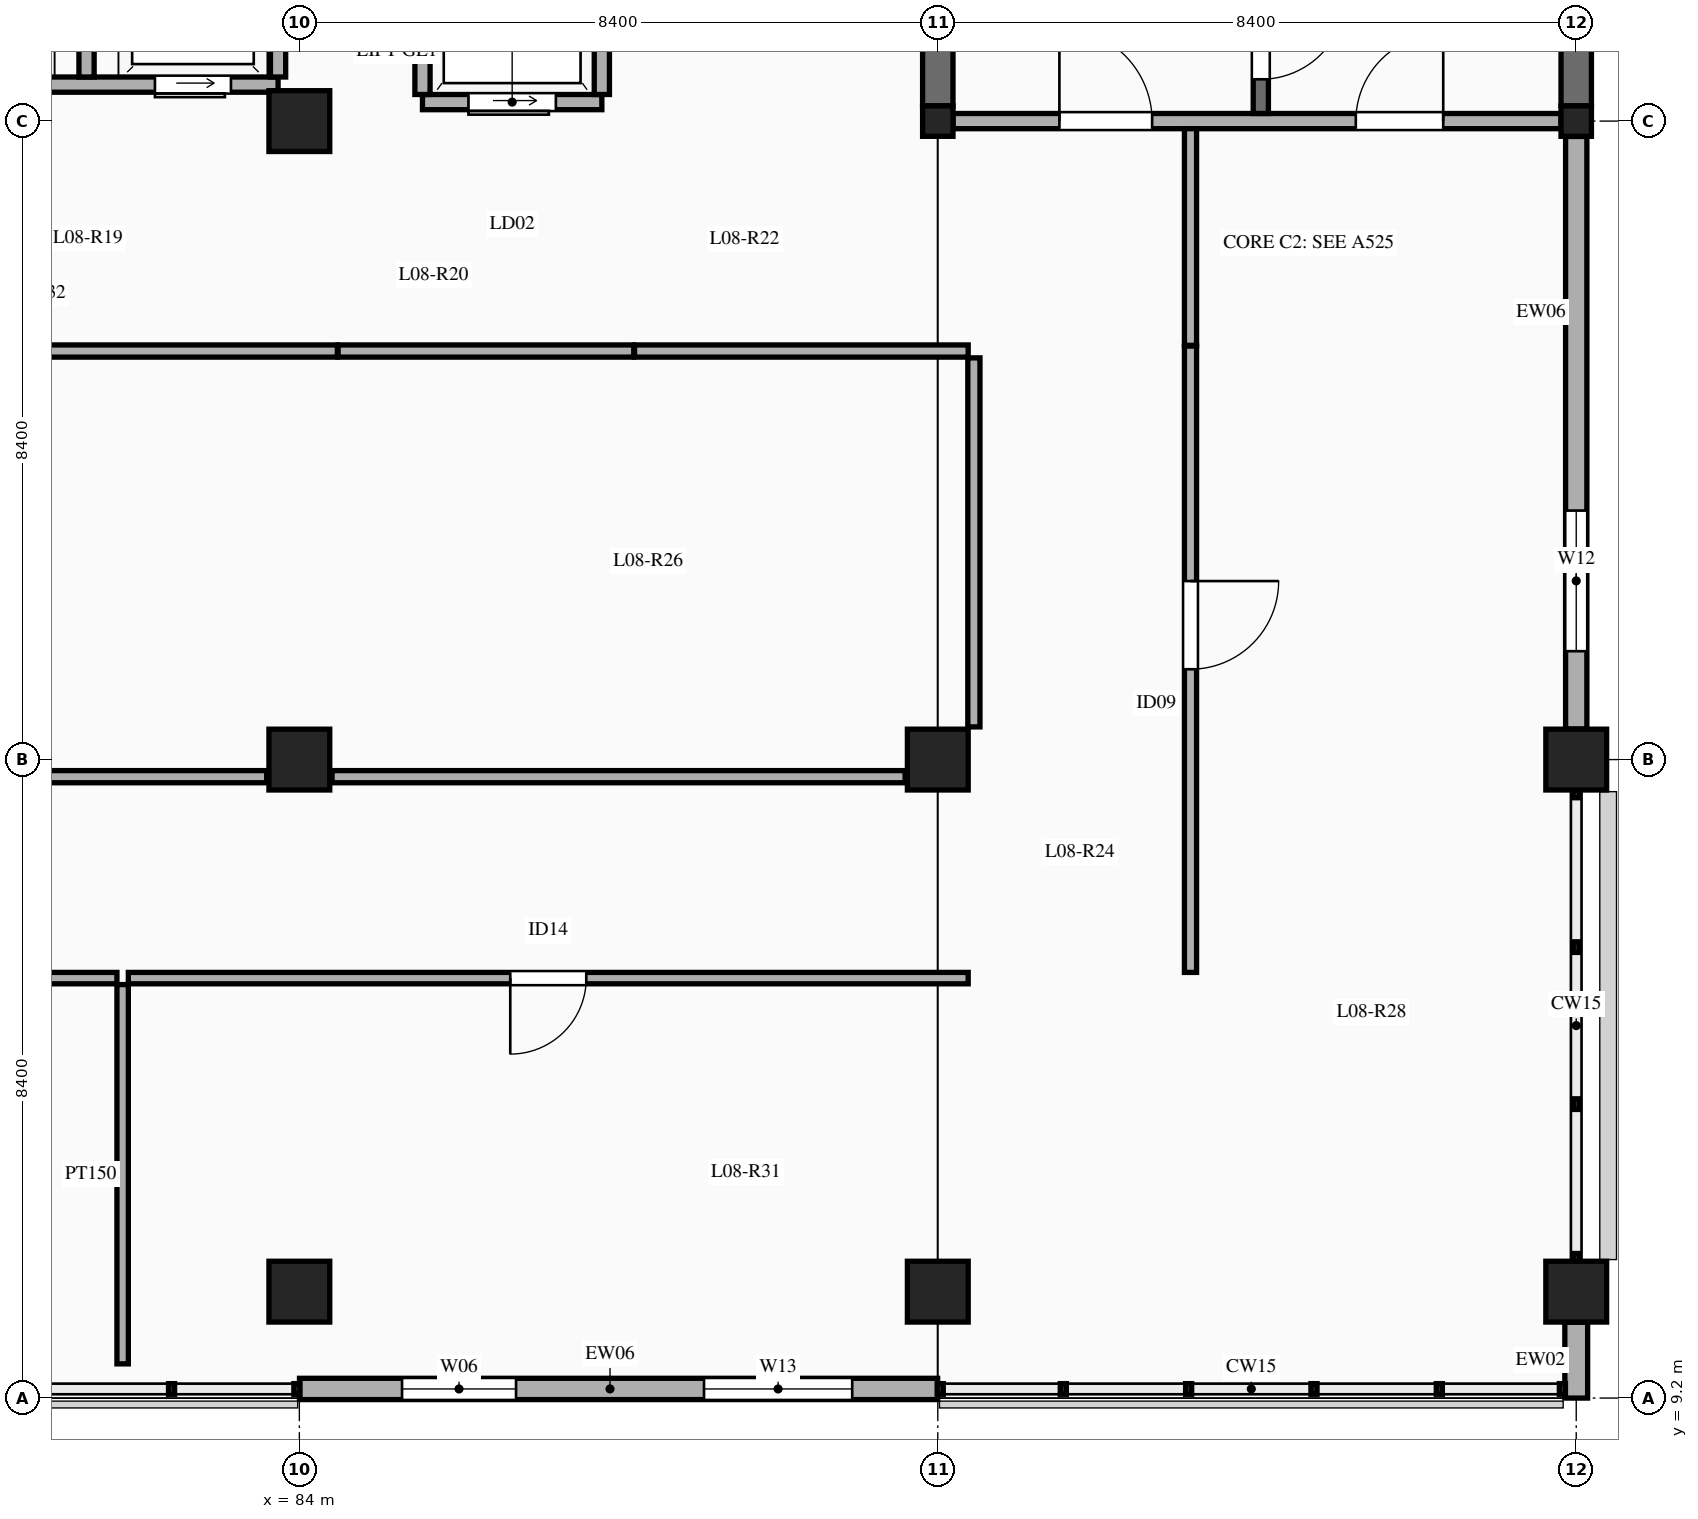
"""IFC4 building model, lengths in metres.
Left out: names, types, materials, properties, quantities, classifications, styles, units other than length and angle.
Written with IfcOpenShell. Run it as: python <this file> out.ifc"""

import sys

from ifc_helpers import new_model, si_unit, direction, frame, frame_2d, origin, origin_2d, place, context, subcontext, project, spatial, rectangle, extrude, element, fill, save


model = new_model("IFC4")
c1 = context("Model", 3, precision=1e-05, world=origin(), true_north=direction((0.0, 1.0)))
c2 = subcontext(c1, "Body", "Model", "MODEL_VIEW")
j1 = project(units=[si_unit("LENGTHUNIT", "METRE"), si_unit("PLANEANGLEUNIT", "RADIAN")], contexts=[c1])
p1 = place(None, origin())
s1 = spatial("IfcSite", under=j1, at=p1, CompositionType="ELEMENT")
p2 = place(p1, origin())
s2 = spatial("IfcBuilding", under=s1, at=p2, CompositionType="ELEMENT")
p3 = place(p2, frame((0.0, 0.0, 37.5)))
s3 = spatial("IfcBuildingStorey", under=s2, at=p3, CompositionType="ELEMENT", Elevation=37.5)
for number, where, z_axis, x_axis in (
    (1, (84.0, 10.6, 0.0), (0.0, 0.0, 1.0), (1.0, 0.0, 0.0)),
    (2, (84.0, 17.6, 0.0), (0.0, 0.0, 1.0), (1.0, 0.0, 0.0)),
    (3, (84.0, 26.0, 0.0), (0.0, 0.0, 1.0), (1.0, 0.0, 0.0)),
    (4, (92.4, 10.6, 0.0), (0.0, 0.0, 1.0), (1.0, 0.0, 0.0)),
    (5, (92.4, 17.6, 0.0), (0.0, 0.0, 1.0), (1.0, 0.0, 0.0)),
):
    element("IfcColumn", number, at=place(p3, frame(where, z_axis=z_axis, x_axis=x_axis)), inside=s3, PredefinedType="COLUMN", context=c2, shape_type="SweptSolid", body=[
        extrude(rectangle(XDim=0.8, YDim=0.8, at=origin_2d()), origin(), (0.0, 0.0, 1.0), 4.5),
    ])
p4 = place(p3, frame((92.4, 26.0, 0.0), z_axis=(0.0, 0.0, 1.0), x_axis=(1.0, 0.0, 0.0)))
e6 = element("IfcColumn", 6, at=p4, inside=s3, PredefinedType="COLUMN", context=c2, shape_type="SweptSolid", body=[
    extrude(rectangle(XDim=0.4, YDim=0.4, at=origin_2d()), origin(), (0.0, 0.0, 1.0), 4.5),
])
for number, where, z_axis, x_axis in (
    (7, (100.8, 10.6, 0.0), (0.0, 0.0, 1.0), (1.0, 0.0, 0.0)),
    (8, (100.8, 17.6, 0.0), (0.0, 0.0, 1.0), (1.0, 0.0, 0.0)),
):
    element("IfcColumn", number, at=place(p3, frame(where, z_axis=z_axis, x_axis=x_axis)), inside=s3, PredefinedType="COLUMN", context=c2, shape_type="SweptSolid", body=[
        extrude(rectangle(XDim=0.8, YDim=0.8, at=origin_2d()), origin(), (0.0, 0.0, 1.0), 4.5),
    ])
p5 = place(p3, frame((100.8, 26.0, 0.0), z_axis=(0.0, 0.0, 1.0), x_axis=(1.0, 0.0, 0.0)))
e9 = element("IfcColumn", 9, at=p5, inside=s3, PredefinedType="COLUMN", context=c2, shape_type="SweptSolid", body=[
    extrude(rectangle(XDim=0.4, YDim=0.4, at=origin_2d()), origin(), (0.0, 0.0, 1.0), 4.5),
])
for number, where, z_axis, x_axis in (
    (10, (92.4, 26.2, 0.0), (0.0, 0.0, 1.0), (0.0, 1.0, 0.0)),
    (11, (100.8, 26.2, 0.0), (0.0, 0.0, 1.0), (0.0, 1.0, 0.0)),
):
    element("IfcWall", number, at=place(p3, frame(where, z_axis=z_axis, x_axis=x_axis)), inside=s3, PredefinedType="SHEAR", context=c2, shape_type="SweptSolid", body=[
        extrude(rectangle(XDim=8.0, YDim=0.4, at=frame_2d((4.0, 0.0))), origin(), (0.0, 0.0, 1.0), 4.5),
    ])
p6 = place(p3, frame((100.8, 9.2, 0.0), z_axis=(0.0, 0.0, 1.0), x_axis=(0.0, 1.0, 0.0)))
e12 = element("IfcWall", 12, at=p6, inside=s3, PredefinedType="SOLIDWALL", context=c2, shape_type="SweptSolid", body=[
    extrude(rectangle(XDim=0.998, YDim=0.3, at=frame_2d((0.499, 0.0))), origin(), (0.0, 0.0, 1.0), 3.55),
])
p7 = place(p3, frame((84.002, 9.32, 0.0), z_axis=(0.0, 0.0, 1.0), x_axis=(1.0, 0.0, 0.0)))
e13 = element("IfcWall", 13, at=p7, inside=s3, PredefinedType="ELEMENTEDWALL", context=c2, shape_type="SweptSolid", body=[
    extrude(rectangle(XDim=8.396, YDim=0.28, at=frame_2d((4.198, 0.0))), origin(), (0.0, 0.0, 1.0), 3.55),
])
p8 = place(p7, frame((1.349, 0.0, 0.9)))
e14 = element("IfcOpeningElement", 14, at=p8, cuts=e13, PredefinedType="OPENING", context=c2, shape_type="SweptSolid", body=[
    extrude(rectangle(XDim=1.5, YDim=2.0, at=frame_2d((0.75, 1.0))), frame((0.0, 0.15, 0.0), z_axis=(0.0, -1.0, 0.0), x_axis=(1.0, 0.0, 0.0)), (0.0, 0.0, 1.0), 0.3),
])
p9 = place(p7, frame((5.322, 0.0, 0.9)))
e15 = element("IfcOpeningElement", 15, at=p9, cuts=e13, PredefinedType="OPENING", context=c2, shape_type="SweptSolid", body=[
    extrude(rectangle(XDim=1.95, YDim=2.0, at=frame_2d((0.975, 1.0))), frame((0.0, 0.15, 0.0), z_axis=(0.0, -1.0, 0.0), x_axis=(1.0, 0.0, 0.0)), (0.0, 0.0, 1.0), 0.3),
])
p10 = place(p3, frame((100.8, 18.002, 0.0), z_axis=(0.0, 0.0, 1.0), x_axis=(0.0, 1.0, 0.0)))
e16 = element("IfcWall", 16, at=p10, inside=s3, PredefinedType="ELEMENTEDWALL", context=c2, shape_type="SweptSolid", body=[
    extrude(rectangle(XDim=7.796, YDim=0.28, at=frame_2d((3.898, 0.0))), origin(), (0.0, 0.0, 1.0), 3.55),
])
p11 = place(p10, frame((1.024, 0.0, 0.9)))
e17 = element("IfcOpeningElement", 17, at=p11, cuts=e16, PredefinedType="OPENING", context=c2, shape_type="SweptSolid", body=[
    extrude(rectangle(XDim=1.85, YDim=2.05, at=frame_2d((0.925, 1.025))), frame((0.0, 0.15, 0.0), z_axis=(0.0, -1.0, 0.0), x_axis=(1.0, 0.0, 0.0)), (0.0, 0.0, 1.0), 0.3),
])
p12 = place(p3, frame((92.6, 26.0, 0.0), z_axis=(0.0, 0.0, 1.0), x_axis=(1.0, 0.0, 0.0)))
e18 = element("IfcWall", 18, at=p12, inside=s3, PredefinedType="SOLIDWALL", context=c2, shape_type="SweptSolid", body=[
    extrude(rectangle(XDim=8.0, YDim=0.2, at=frame_2d((4.0, 0.0))), origin(), (0.0, 0.0, 1.0), 3.78),
])
p13 = place(p12, frame((1.4, 0.0, 0.0)))
e19 = element("IfcOpeningElement", 19, at=p13, cuts=e18, PredefinedType="OPENING", context=c2, shape_type="SweptSolid", body=[
    extrude(rectangle(XDim=1.22, YDim=2.15, at=frame_2d((0.61, 1.075))), frame((0.0, 0.11, 0.0), z_axis=(0.0, -1.0, 0.0), x_axis=(1.0, 0.0, 0.0)), (0.0, 0.0, 1.0), 0.22),
])
p14 = place(p12, frame((5.3, 0.0, 0.0)))
e20 = element("IfcOpeningElement", 20, at=p14, cuts=e18, PredefinedType="OPENING", context=c2, shape_type="SweptSolid", body=[
    extrude(rectangle(XDim=1.15, YDim=2.15, at=frame_2d((0.575, 1.075))), frame((0.0, 0.11, 0.0), z_axis=(0.0, -1.0, 0.0), x_axis=(1.0, 0.0, 0.0)), (0.0, 0.0, 1.0), 0.22),
])
p15 = place(p3, frame((96.65, 26.1, 0.0), z_axis=(0.0, 0.0, 1.0), x_axis=(0.0, 1.0, 0.0)))
e21 = element("IfcWall", 21, at=p15, inside=s3, PredefinedType="SOLIDWALL", context=c2, shape_type="SweptSolid", body=[
    extrude(rectangle(XDim=8.1, YDim=0.2, at=frame_2d((4.05, 0.0))), origin(), (0.0, 0.0, 1.0), 4.3),
])
p16 = place(p15, frame((0.45, 0.0, 0.0)))
e22 = element("IfcOpeningElement", 22, at=p16, cuts=e21, PredefinedType="OPENING", context=c2, shape_type="SweptSolid", body=[
    extrude(rectangle(XDim=1.12, YDim=2.15, at=frame_2d((0.56, 1.075))), frame((0.0, 0.11, 0.0), z_axis=(0.0, -1.0, 0.0), x_axis=(1.0, 0.0, 0.0)), (0.0, 0.0, 1.0), 0.22),
])
p17 = place(p3, frame((75.95, 26.48, 0.0), z_axis=(0.0, 0.0, 1.0), x_axis=(1.0, 0.0, 0.0)))
e23 = element("IfcWall", 23, at=p17, inside=s3, PredefinedType="SOLIDWALL", context=c2, shape_type="SweptSolid", body=[
    extrude(rectangle(XDim=7.77, YDim=0.2, at=frame_2d((3.885, 0.0))), origin(), (0.0, 0.0, 1.0), 4.3),
])
p18 = place(p17, frame((0.55, 0.0, 0.0)))
e24 = element("IfcOpeningElement", 24, at=p18, cuts=e23, PredefinedType="OPENING", context=c2, shape_type="SweptSolid", body=[
    extrude(rectangle(XDim=1.0, YDim=2.15, at=frame_2d((0.5, 1.075))), frame((0.0, 0.11, 0.0), z_axis=(0.0, -1.0, 0.0), x_axis=(1.0, 0.0, 0.0)), (0.0, 0.0, 1.0), 0.22),
])
p19 = place(p17, frame((3.35, 0.0, 0.0)))
e25 = element("IfcOpeningElement", 25, at=p19, cuts=e23, PredefinedType="OPENING", context=c2, shape_type="SweptSolid", body=[
    extrude(rectangle(XDim=1.0, YDim=2.15, at=frame_2d((0.5, 1.075))), frame((0.0, 0.11, 0.0), z_axis=(0.0, -1.0, 0.0), x_axis=(1.0, 0.0, 0.0)), (0.0, 0.0, 1.0), 0.22),
])
p20 = place(p17, frame((6.15, 0.0, 0.0)))
e26 = element("IfcOpeningElement", 26, at=p20, cuts=e23, PredefinedType="OPENING", context=c2, shape_type="SweptSolid", body=[
    extrude(rectangle(XDim=1.0, YDim=2.15, at=frame_2d((0.5, 1.075))), frame((0.0, 0.11, 0.0), z_axis=(0.0, -1.0, 0.0), x_axis=(1.0, 0.0, 0.0)), (0.0, 0.0, 1.0), 0.22),
])
p21 = place(p3, frame((81.2, 26.58, 0.0), z_axis=(0.0, 0.0, 1.0), x_axis=(0.0, 1.0, 0.0)))
e27 = element("IfcWall", 27, at=p21, inside=s3, PredefinedType="SOLIDWALL", context=c2, shape_type="SweptSolid", body=[
    extrude(rectangle(XDim=1.84, YDim=0.2, at=frame_2d((0.92, 0.0))), origin(), (0.0, 0.0, 1.0), 4.3),
])
p22 = place(p3, frame((83.72, 26.58, 0.0), z_axis=(0.0, 0.0, 1.0), x_axis=(0.0, 1.0, 0.0)))
e28 = element("IfcWall", 28, at=p22, inside=s3, PredefinedType="SOLIDWALL", context=c2, shape_type="SweptSolid", body=[
    extrude(rectangle(XDim=1.84, YDim=0.2, at=frame_2d((0.92, 0.0))), origin(), (0.0, 0.0, 1.0), 3.83),
])
p23 = place(p3, frame((85.62, 26.25, 0.0), z_axis=(0.0, 0.0, 1.0), x_axis=(1.0, 0.0, 0.0)))
e29 = element("IfcWall", 29, at=p23, inside=s3, PredefinedType="SOLIDWALL", context=c2, shape_type="SweptSolid", body=[
    extrude(rectangle(XDim=2.36, YDim=0.2, at=frame_2d((1.18, 0.0))), origin(), (0.0, 0.0, 1.0), 3.78),
])
p24 = place(p23, frame((0.605, 0.0, 0.0)))
e30 = element("IfcOpeningElement", 30, at=p24, cuts=e29, PredefinedType="OPENING", context=c2, shape_type="SweptSolid", body=[
    extrude(rectangle(XDim=1.15, YDim=2.2, at=frame_2d((0.575, 1.1))), frame((0.0, 0.11, 0.0), z_axis=(0.0, -1.0, 0.0), x_axis=(1.0, 0.0, 0.0)), (0.0, 0.0, 1.0), 0.22),
])
p25 = place(p3, frame((85.62, 26.35, 0.0), z_axis=(0.0, 0.0, 1.0), x_axis=(0.0, 1.0, 0.0)))
e31 = element("IfcWall", 31, at=p25, inside=s3, PredefinedType="SOLIDWALL", context=c2, shape_type="SweptSolid", body=[
    extrude(rectangle(XDim=2.9, YDim=0.2, at=frame_2d((1.45, 0.0))), origin(), (0.0, 0.0, 1.0), 4.3),
])
p26 = place(p3, frame((87.98, 26.35, 0.0), z_axis=(0.0, 0.0, 1.0), x_axis=(0.0, 1.0, 0.0)))
e32 = element("IfcWall", 32, at=p26, inside=s3, PredefinedType="SOLIDWALL", context=c2, shape_type="SweptSolid", body=[
    extrude(rectangle(XDim=2.9, YDim=0.2, at=frame_2d((1.45, 0.0))), origin(), (0.0, 0.0, 1.0), 3.98),
])
p27 = place(p3, frame((76.05, 22.975, 0.0), z_axis=(0.0, 0.0, 1.0), x_axis=(1.0, 0.0, 0.0)))
e33 = element("IfcWall", 33, at=p27, inside=s3, PredefinedType="PARTITIONING", context=c2, shape_type="SweptSolid", body=[
    extrude(rectangle(XDim=8.45, YDim=0.16, at=frame_2d((4.225, 0.0))), origin(), (0.0, 0.0, 1.0), 3.45),
])
p28 = place(p3, frame((84.51, 22.975, 0.0), z_axis=(0.0, 0.0, 1.0), x_axis=(1.0, 0.0, 0.0)))
e34 = element("IfcWall", 34, at=p28, inside=s3, PredefinedType="PARTITIONING", context=c2, shape_type="SweptSolid", body=[
    extrude(rectangle(XDim=3.89, YDim=0.16, at=frame_2d((1.945, 0.0))), origin(), (0.0, 0.0, 1.0), 3.45),
])
p29 = place(p3, frame((88.41, 22.975, 0.0), z_axis=(0.0, 0.0, 1.0), x_axis=(1.0, 0.0, 0.0)))
e35 = element("IfcWall", 35, at=p29, inside=s3, PredefinedType="PARTITIONING", context=c2, shape_type="SweptSolid", body=[
    extrude(rectangle(XDim=4.39, YDim=0.16, at=frame_2d((2.195, 0.0))), origin(), (0.0, 0.0, 1.0), 3.45),
])
p30 = place(p3, frame((95.725, 23.05, 0.0), z_axis=(0.0, 0.0, 1.0), x_axis=(0.0, 1.0, 0.0)))
e36 = element("IfcWall", 36, at=p30, inside=s3, PredefinedType="PARTITIONING", context=c2, shape_type="SweptSolid", body=[
    extrude(rectangle(XDim=2.85, YDim=0.16, at=frame_2d((1.425, 0.0))), origin(), (0.0, 0.0, 1.0), 3.45),
])
p31 = place(p3, frame((92.875, 18.03, 0.0), z_axis=(0.0, 0.0, 1.0), x_axis=(0.0, 1.0, 0.0)))
e37 = element("IfcWall", 37, at=p31, inside=s3, PredefinedType="PARTITIONING", context=c2, shape_type="SweptSolid", body=[
    extrude(rectangle(XDim=4.855, YDim=0.16, at=frame_2d((2.427, 0.0))), origin(), (0.0, 0.0, 1.0), 3.45),
])
p32 = place(p3, frame((95.725, 14.8, 0.0), z_axis=(0.0, 0.0, 1.0), x_axis=(0.0, 1.0, 0.0)))
e38 = element("IfcWall", 38, at=p32, inside=s3, PredefinedType="PARTITIONING", context=c2, shape_type="SweptSolid", body=[
    extrude(rectangle(XDim=8.24, YDim=0.16, at=frame_2d((4.12, 0.0))), origin(), (0.0, 0.0, 1.0), 3.45),
])
p33 = place(p32, frame((3.989, 0.0, 0.0)))
e39 = element("IfcOpeningElement", 39, at=p33, cuts=e38, PredefinedType="OPENING", context=c2, shape_type="SweptSolid", body=[
    extrude(rectangle(XDim=1.16, YDim=2.2, at=frame_2d((0.58, 1.1))), frame((0.0, 0.09, 0.0), z_axis=(0.0, -1.0, 0.0), x_axis=(1.0, 0.0, 0.0)), (0.0, 0.0, 1.0), 0.18),
])
for number, where, z_axis, x_axis in (
    (40, (76.03, 17.375, 0.0), (0.0, 0.0, 1.0), (1.0, 0.0, 0.0)),
    (41, (84.43, 17.375, 0.0), (0.0, 0.0, 1.0), (1.0, 0.0, 0.0)),
):
    element("IfcWall", number, at=place(p3, frame(where, z_axis=z_axis, x_axis=x_axis)), inside=s3, PredefinedType="PARTITIONING", context=c2, shape_type="SweptSolid", body=[
        extrude(rectangle(XDim=7.54, YDim=0.16, at=frame_2d((3.77, 0.0))), origin(), (0.0, 0.0, 1.0), 3.45),
    ])
p34 = place(p3, frame((70.15, 14.725, 0.0), z_axis=(0.0, 0.0, 1.0), x_axis=(1.0, 0.0, 0.0)))
e42 = element("IfcWall", 42, at=p34, inside=s3, PredefinedType="PARTITIONING", context=c2, shape_type="SweptSolid", body=[
    extrude(rectangle(XDim=11.45, YDim=0.15, at=frame_2d((5.725, 0.0))), origin(), (0.0, 0.0, 1.0), 3.45),
])
p35 = place(p34, frame((7.637, 0.0, 0.0)))
e43 = element("IfcOpeningElement", 43, at=p35, cuts=e42, PredefinedType="OPENING", context=c2, shape_type="SweptSolid", body=[
    extrude(rectangle(XDim=1.0, YDim=2.15, at=frame_2d((0.5, 1.075))), frame((0.0, 0.085, 0.0), z_axis=(0.0, -1.0, 0.0), x_axis=(1.0, 0.0, 0.0)), (0.0, 0.0, 1.0), 0.17),
])
p36 = place(p3, frame((81.75, 14.725, 0.0), z_axis=(0.0, 0.0, 1.0), x_axis=(1.0, 0.0, 0.0)))
e44 = element("IfcWall", 44, at=p36, inside=s3, PredefinedType="PARTITIONING", context=c2, shape_type="SweptSolid", body=[
    extrude(rectangle(XDim=11.05, YDim=0.15, at=frame_2d((5.525, 0.0))), origin(), (0.0, 0.0, 1.0), 3.45),
])
p37 = place(p36, frame((5.025, 0.0, 0.0)))
e45 = element("IfcOpeningElement", 45, at=p37, cuts=e44, PredefinedType="OPENING", context=c2, shape_type="SweptSolid", body=[
    extrude(rectangle(XDim=1.0, YDim=2.15, at=frame_2d((0.5, 1.075))), frame((0.0, 0.085, 0.0), z_axis=(0.0, -1.0, 0.0), x_axis=(1.0, 0.0, 0.0)), (0.0, 0.0, 1.0), 0.17),
])
p38 = place(p3, frame((81.675, 9.65, 0.0), z_axis=(0.0, 0.0, 1.0), x_axis=(0.0, 1.0, 0.0)))
e46 = element("IfcWall", 46, at=p38, inside=s3, PredefinedType="PARTITIONING", context=c2, shape_type="SweptSolid", body=[
    extrude(rectangle(XDim=4.99, YDim=0.15, at=frame_2d((2.495, 0.0))), origin(), (0.0, 0.0, 1.0), 3.45),
])
p39 = place(p8, origin())
e47 = element("IfcWindow", 47, at=p39, inside=s3, PartitioningType="DOUBLE_PANEL_VERTICAL", PredefinedType="WINDOW", context=c2, shape_type="SweptSolid", body=[
    extrude(rectangle(XDim=1.5, YDim=2.0, at=frame_2d((0.75, 1.0))), frame((0.0, 0.03, 0.0), z_axis=(0.0, -1.0, 0.0), x_axis=(1.0, 0.0, 0.0)), (0.0, 0.0, 1.0), 0.06),
])
fill(e14, e47)
p40 = place(p9, origin())
e48 = element("IfcWindow", 48, at=p40, inside=s3, PartitioningType="TRIPLE_PANEL_VERTICAL", PredefinedType="WINDOW", context=c2, shape_type="SweptSolid", body=[
    extrude(rectangle(XDim=1.95, YDim=2.0, at=frame_2d((0.975, 1.0))), frame((0.0, 0.03, 0.0), z_axis=(0.0, -1.0, 0.0), x_axis=(1.0, 0.0, 0.0)), (0.0, 0.0, 1.0), 0.06),
])
fill(e15, e48)
p41 = place(p11, origin())
e49 = element("IfcWindow", 49, at=p41, inside=s3, PartitioningType="DOUBLE_PANEL_HORIZONTAL", PredefinedType="WINDOW", context=c2, shape_type="SweptSolid", body=[
    extrude(rectangle(XDim=1.85, YDim=2.05, at=frame_2d((0.925, 1.025))), frame((0.0, 0.03, 0.0), z_axis=(0.0, -1.0, 0.0), x_axis=(1.0, 0.0, 0.0)), (0.0, 0.0, 1.0), 0.06),
])
fill(e17, e49)
p42 = place(p13, origin())
e50 = element("IfcDoor", 50, at=p42, inside=s3, OperationType="SINGLE_SWING_LEFT", PredefinedType="DOOR", context=c2, shape_type="SweptSolid", body=[
    extrude(rectangle(XDim=1.22, YDim=2.15, at=frame_2d((0.61, 1.075))), frame((0.0, 0.025, 0.0), z_axis=(0.0, -1.0, 0.0), x_axis=(1.0, 0.0, 0.0)), (0.0, 0.0, 1.0), 0.05),
])
fill(e19, e50)
p43 = place(p14, origin())
e51 = element("IfcDoor", 51, at=p43, inside=s3, OperationType="SINGLE_SWING_RIGHT", PredefinedType="DOOR", context=c2, shape_type="SweptSolid", body=[
    extrude(rectangle(XDim=1.15, YDim=2.15, at=frame_2d((0.575, 1.075))), frame((0.0, 0.025, 0.0), z_axis=(0.0, -1.0, 0.0), x_axis=(1.0, 0.0, 0.0)), (0.0, 0.0, 1.0), 0.05),
])
fill(e20, e51)
p44 = place(p16, frame((1.12, 0.0, 0.0), z_axis=(0.0, 0.0, 1.0), x_axis=(-1.0, 0.0, 0.0)))
e52 = element("IfcDoor", 52, at=p44, inside=s3, OperationType="SINGLE_SWING_LEFT", PredefinedType="DOOR", context=c2, shape_type="SweptSolid", body=[
    extrude(rectangle(XDim=1.12, YDim=2.15, at=frame_2d((0.56, 1.075))), frame((0.0, 0.025, 0.0), z_axis=(0.0, -1.0, 0.0), x_axis=(1.0, 0.0, 0.0)), (0.0, 0.0, 1.0), 0.05),
])
fill(e22, e52)
p45 = place(p20, frame((1.0, 0.0, 0.0), z_axis=(0.0, 0.0, 1.0), x_axis=(-1.0, 0.0, 0.0)))
e53 = element("IfcDoor", 53, at=p45, inside=s3, OperationType="SLIDING_TO_LEFT", PredefinedType="DOOR", context=c2, shape_type="SweptSolid", body=[
    extrude(rectangle(XDim=1.0, YDim=2.15, at=frame_2d((0.5, 1.075))), frame((0.0, 0.025, 0.0), z_axis=(0.0, -1.0, 0.0), x_axis=(1.0, 0.0, 0.0)), (0.0, 0.0, 1.0), 0.05),
])
fill(e26, e53)
p46 = place(p24, frame((1.15, 0.0, 0.0), z_axis=(0.0, 0.0, 1.0), x_axis=(-1.0, 0.0, 0.0)))
e54 = element("IfcDoor", 54, at=p46, inside=s3, OperationType="SLIDING_TO_LEFT", PredefinedType="DOOR", context=c2, shape_type="SweptSolid", body=[
    extrude(rectangle(XDim=1.15, YDim=2.2, at=frame_2d((0.575, 1.1))), frame((0.0, 0.025, 0.0), z_axis=(0.0, -1.0, 0.0), x_axis=(1.0, 0.0, 0.0)), (0.0, 0.0, 1.0), 0.05),
])
fill(e30, e54)
p47 = place(p33, frame((1.16, 0.0, 0.0), z_axis=(0.0, 0.0, 1.0), x_axis=(-1.0, 0.0, 0.0)))
e55 = element("IfcDoor", 55, at=p47, inside=s3, OperationType="SINGLE_SWING_LEFT", PredefinedType="DOOR", context=c2, shape_type="SweptSolid", body=[
    extrude(rectangle(XDim=1.16, YDim=2.2, at=frame_2d((0.58, 1.1))), frame((0.0, 0.025, 0.0), z_axis=(0.0, -1.0, 0.0), x_axis=(1.0, 0.0, 0.0)), (0.0, 0.0, 1.0), 0.05),
])
fill(e39, e55)
p48 = place(p37, frame((1.0, 0.0, 0.0), z_axis=(0.0, 0.0, 1.0), x_axis=(-1.0, 0.0, 0.0)))
e56 = element("IfcDoor", 56, at=p48, inside=s3, OperationType="SINGLE_SWING_RIGHT", PredefinedType="DOOR", context=c2, shape_type="SweptSolid", body=[
    extrude(rectangle(XDim=1.0, YDim=2.15, at=frame_2d((0.5, 1.075))), frame((0.0, 0.025, 0.0), z_axis=(0.0, -1.0, 0.0), x_axis=(1.0, 0.0, 0.0)), (0.0, 0.0, 1.0), 0.05),
])
fill(e45, e56)
save(model, sys.argv[1])
